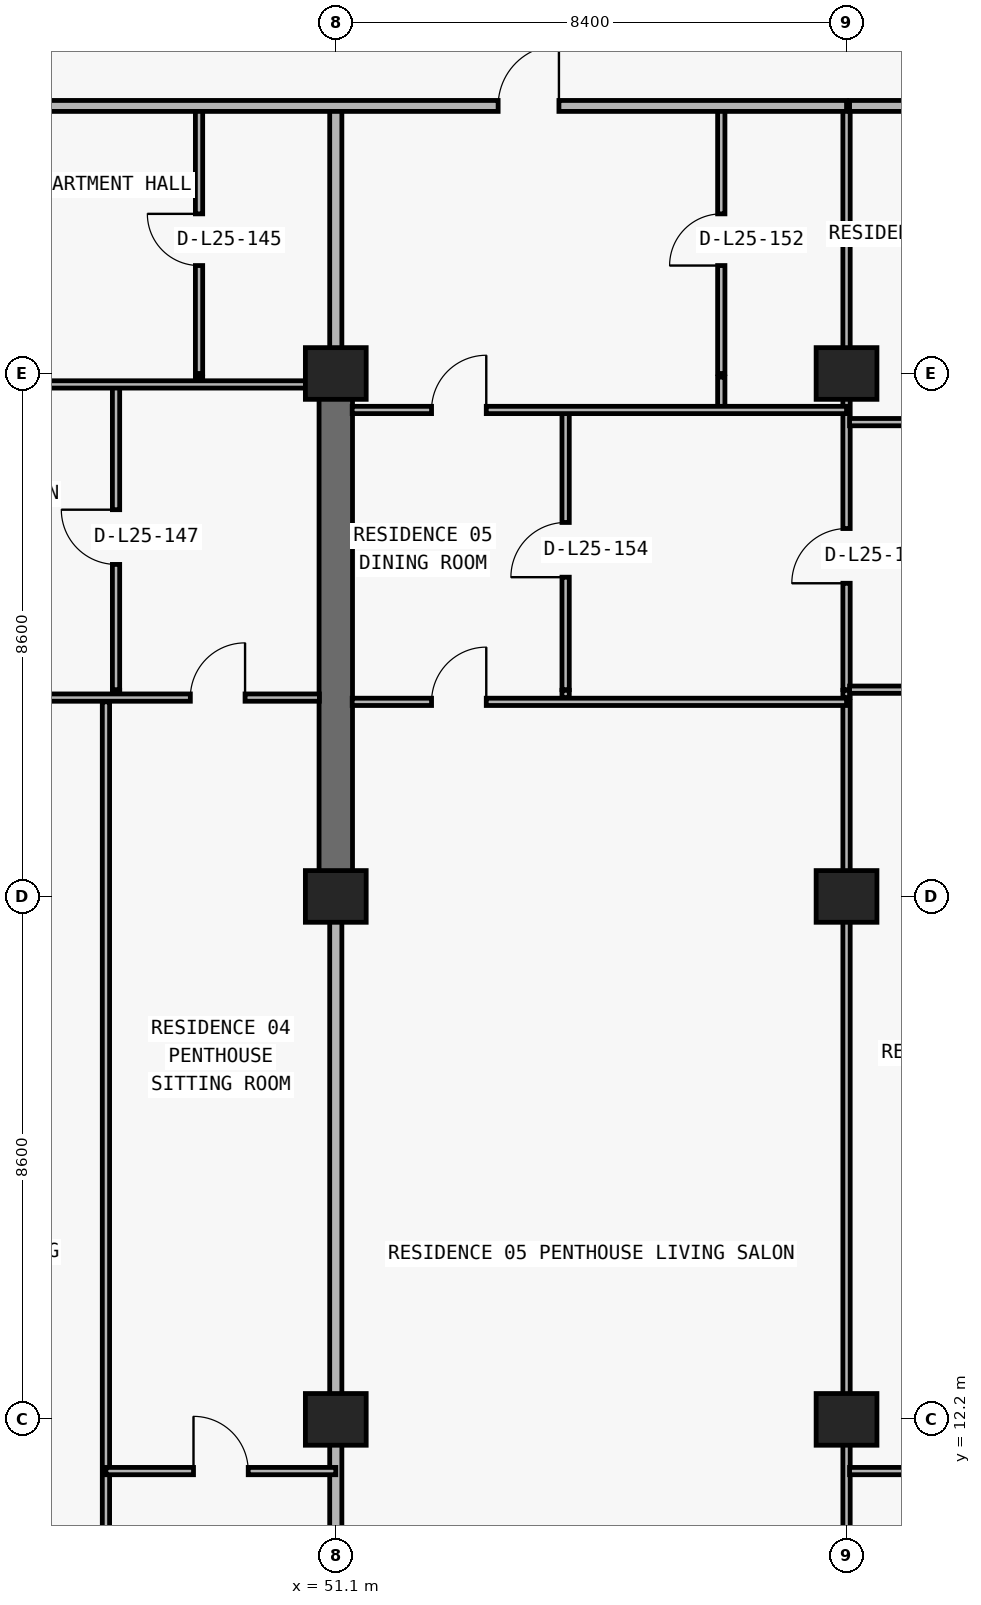
"""IFC4 building model, lengths in metres.
Left out: names, types, materials, properties, quantities, classifications, styles, units other than length and angle.
Written with IfcOpenShell. Run it as: python <this file> out.ifc"""

import sys

from ifc_helpers import new_model, si_unit, direction, frame, frame_2d, origin, origin_2d, place, context, subcontext, project, spatial, rectangle, extrude, element, fill, save


model = new_model("IFC4")
c1 = context("Model", 3, precision=1e-05, world=origin(), true_north=direction((0.0, 1.0)))
c2 = subcontext(c1, "Body", "Model", "MODEL_VIEW")
j1 = project(units=[si_unit("LENGTHUNIT", "METRE"), si_unit("PLANEANGLEUNIT", "RADIAN")], contexts=[c1])
p1 = place(None, origin())
s1 = spatial("IfcSite", under=j1, at=p1, CompositionType="ELEMENT")
p2 = place(p1, origin())
s2 = spatial("IfcBuilding", under=s1, at=p2, CompositionType="ELEMENT")
p3 = place(p2, frame((0.0, 0.0, 94.5)))
s3 = spatial("IfcBuildingStorey", under=s2, at=p3, CompositionType="ELEMENT", Elevation=94.5)
for number, where, z_axis, x_axis in (
    (1, (51.1, 12.2, 0.0), (0.0, 0.0, 1.0), (1.0, 0.0, 0.0)),
    (2, (59.5, 12.2, 0.0), (0.0, 0.0, 1.0), (1.0, 0.0, 0.0)),
    (3, (51.1, 20.8, 0.0), (0.0, 0.0, 1.0), (1.0, 0.0, 0.0)),
    (4, (59.5, 20.8, 0.0), (0.0, 0.0, 1.0), (1.0, 0.0, 0.0)),
    (5, (51.1, 29.4, 0.0), (0.0, 0.0, 1.0), (1.0, 0.0, 0.0)),
    (6, (59.5, 29.4, 0.0), (0.0, 0.0, 1.0), (1.0, 0.0, 0.0)),
):
    element("IfcColumn", number, at=place(p3, frame(where, z_axis=z_axis, x_axis=x_axis)), inside=s3, PredefinedType="COLUMN", context=c2, shape_type="SweptSolid", body=[
        extrude(rectangle(XDim=1.0, YDim=0.85, at=origin_2d()), origin(), (0.0, 0.0, 1.0), 3.0),
    ])
p4 = place(p3, frame((51.1, 20.8, 0.0), z_axis=(0.0, 0.0, 1.0), x_axis=(0.0, 1.0, 0.0)))
e7 = element("IfcWall", 7, at=p4, inside=s3, PredefinedType="SHEAR", context=c2, shape_type="SweptSolid", body=[
    extrude(rectangle(XDim=8.6, YDim=0.55, at=frame_2d((4.3, 0.0))), origin(), (0.0, 0.0, 1.0), 3.0),
])
p5 = place(p3, frame((47.32, 8.84, 0.0), z_axis=(0.0, 0.0, 1.0), x_axis=(0.0, 1.0, 0.0)))
e8 = element("IfcWall", 8, at=p5, inside=s3, PredefinedType="PARTITIONING", context=c2, shape_type="SweptSolid", body=[
    extrude(rectangle(XDim=15.16, YDim=0.12, at=frame_2d((7.58, 0.0))), origin(), (0.0, 0.0, 1.0), 3.0),
])
p6 = place(p3, frame((47.486, 24.07, 0.0), z_axis=(0.0, 0.0, 1.0), x_axis=(0.0, 1.0, 0.0)))
e9 = element("IfcWall", 9, at=p6, inside=s3, PredefinedType="PARTITIONING", context=c2, shape_type="SweptSolid", body=[
    extrude(rectangle(XDim=0.12, YDim=0.12, at=frame_2d((0.06, 0.0))), origin(), (0.0, 0.0, 1.0), 3.0),
])
p7 = place(p3, frame((47.486, 24.2, 0.0), z_axis=(0.0, 0.0, 1.0), x_axis=(0.0, 1.0, 0.0)))
e10 = element("IfcWall", 10, at=p7, inside=s3, PredefinedType="PARTITIONING", context=c2, shape_type="SweptSolid", body=[
    extrude(rectangle(XDim=5.02, YDim=0.12, at=frame_2d((2.51, 0.0))), origin(), (0.0, 0.0, 1.0), 3.0),
])
p8 = place(p7, frame((2.06, 0.0, 0.0)))
e11 = element("IfcOpeningElement", 11, at=p8, cuts=e10, PredefinedType="OPENING", context=c2, shape_type="SweptSolid", body=[
    extrude(rectangle(XDim=0.9, YDim=2.15, at=frame_2d((0.45, 1.075))), frame((0.0, 0.07, 0.0), z_axis=(0.0, -1.0, 0.0), x_axis=(1.0, 0.0, 0.0)), (0.0, 0.0, 1.0), 0.14),
])
p9 = place(p3, frame((48.851, 29.22, 0.0), z_axis=(0.0, 0.0, 1.0), x_axis=(0.0, 1.0, 0.0)))
e12 = element("IfcWall", 12, at=p9, inside=s3, PredefinedType="PARTITIONING", context=c2, shape_type="SweptSolid", body=[
    extrude(rectangle(XDim=0.12, YDim=0.12, at=frame_2d((0.06, 0.0))), origin(), (0.0, 0.0, 1.0), 3.0),
])
p10 = place(p3, frame((48.851, 29.4, 0.0), z_axis=(0.0, 0.0, 1.0), x_axis=(0.0, 1.0, 0.0)))
e13 = element("IfcWall", 13, at=p10, inside=s3, PredefinedType="PARTITIONING", context=c2, shape_type="SweptSolid", body=[
    extrude(rectangle(XDim=4.4, YDim=0.12, at=frame_2d((2.2, 0.0))), origin(), (0.0, 0.0, 1.0), 3.0),
])
p11 = place(p10, frame((1.775, 0.0, 0.0)))
e14 = element("IfcOpeningElement", 14, at=p11, cuts=e13, PredefinedType="OPENING", context=c2, shape_type="SweptSolid", body=[
    extrude(rectangle(XDim=0.85, YDim=2.1, at=frame_2d((0.425, 1.05))), frame((0.0, 0.07, 0.0), z_axis=(0.0, -1.0, 0.0), x_axis=(1.0, 0.0, 0.0)), (0.0, 0.0, 1.0), 0.14),
])
p12 = place(p3, frame((51.1, 8.84, 0.0), z_axis=(0.0, 0.0, 1.0), x_axis=(0.0, 1.0, 0.0)))
e15 = element("IfcWall", 15, at=p12, inside=s3, PredefinedType="PARTITIONING", context=c2, shape_type="SweptSolid", body=[
    extrude(rectangle(XDim=11.955, YDim=0.2, at=frame_2d((5.978, 0.0))), origin(), (0.0, 0.0, 1.0), 2.124),
])
p13 = place(p3, frame((51.1, 29.405, 0.0), z_axis=(0.0, 0.0, 1.0), x_axis=(0.0, 1.0, 0.0)))
e16 = element("IfcWall", 16, at=p13, inside=s3, PredefinedType="PARTITIONING", context=c2, shape_type="SweptSolid", body=[
    extrude(rectangle(XDim=4.395, YDim=0.2, at=frame_2d((2.198, 0.0))), origin(), (0.0, 0.0, 1.0), 2.285),
])
p14 = place(p3, frame((54.88, 24.07, 0.0), z_axis=(0.0, 0.0, 1.0), x_axis=(0.0, 1.0, 0.0)))
e17 = element("IfcWall", 17, at=p14, inside=s3, PredefinedType="PARTITIONING", context=c2, shape_type="SweptSolid", body=[
    extrude(rectangle(XDim=0.12, YDim=0.12, at=frame_2d((0.06, 0.0))), origin(), (0.0, 0.0, 1.0), 3.0),
])
p15 = place(p3, frame((54.88, 24.2, 0.0), z_axis=(0.0, 0.0, 1.0), x_axis=(0.0, 1.0, 0.0)))
e18 = element("IfcWall", 18, at=p15, inside=s3, PredefinedType="PARTITIONING", context=c2, shape_type="SweptSolid", body=[
    extrude(rectangle(XDim=4.6, YDim=0.12, at=frame_2d((2.3, 0.0))), origin(), (0.0, 0.0, 1.0), 3.0),
])
p16 = place(p15, frame((1.85, 0.0, 0.0)))
e19 = element("IfcOpeningElement", 19, at=p16, cuts=e18, PredefinedType="OPENING", context=c2, shape_type="SweptSolid", body=[
    extrude(rectangle(XDim=0.9, YDim=2.15, at=frame_2d((0.45, 1.075))), frame((0.0, 0.07, 0.0), z_axis=(0.0, -1.0, 0.0), x_axis=(1.0, 0.0, 0.0)), (0.0, 0.0, 1.0), 0.14),
])
p17 = place(p3, frame((57.44, 28.8, 0.0), z_axis=(0.0, 0.0, 1.0), x_axis=(0.0, 1.0, 0.0)))
e20 = element("IfcWall", 20, at=p17, inside=s3, PredefinedType="PARTITIONING", context=c2, shape_type="SweptSolid", body=[
    extrude(rectangle(XDim=0.54, YDim=0.12, at=frame_2d((0.27, 0.0))), origin(), (0.0, 0.0, 1.0), 2.629),
])
p18 = place(p3, frame((57.44, 29.4, 0.0), z_axis=(0.0, 0.0, 1.0), x_axis=(0.0, 1.0, 0.0)))
e21 = element("IfcWall", 21, at=p18, inside=s3, PredefinedType="PARTITIONING", context=c2, shape_type="SweptSolid", body=[
    extrude(rectangle(XDim=4.4, YDim=0.12, at=frame_2d((2.2, 0.0))), origin(), (0.0, 0.0, 1.0), 3.0),
])
p19 = place(p18, frame((1.775, 0.0, 0.0)))
e22 = element("IfcOpeningElement", 22, at=p19, cuts=e21, PredefinedType="OPENING", context=c2, shape_type="SweptSolid", body=[
    extrude(rectangle(XDim=0.85, YDim=2.1, at=frame_2d((0.425, 1.05))), frame((0.0, 0.07, 0.0), z_axis=(0.0, -1.0, 0.0), x_axis=(1.0, 0.0, 0.0)), (0.0, 0.0, 1.0), 0.14),
])
p20 = place(p3, frame((59.5, 8.84, 0.0), z_axis=(0.0, 0.0, 1.0), x_axis=(0.0, 1.0, 0.0)))
e23 = element("IfcWall", 23, at=p20, inside=s3, PredefinedType="PARTITIONING", context=c2, shape_type="SweptSolid", body=[
    extrude(rectangle(XDim=15.16, YDim=0.12, at=frame_2d((7.58, 0.0))), origin(), (0.0, 0.0, 1.0), 2.124),
])
p21 = place(p3, frame((59.5, 24.07, 0.0), z_axis=(0.0, 0.0, 1.0), x_axis=(0.0, 1.0, 0.0)))
e24 = element("IfcWall", 24, at=p21, inside=s3, PredefinedType="PARTITIONING", context=c2, shape_type="SweptSolid", body=[
    extrude(rectangle(XDim=0.12, YDim=0.12, at=frame_2d((0.06, 0.0))), origin(), (0.0, 0.0, 1.0), 2.124),
])
p22 = place(p3, frame((59.5, 24.2, 0.0), z_axis=(0.0, 0.0, 1.0), x_axis=(0.0, 1.0, 0.0)))
e25 = element("IfcWall", 25, at=p22, inside=s3, PredefinedType="PARTITIONING", context=c2, shape_type="SweptSolid", body=[
    extrude(rectangle(XDim=5.14, YDim=0.12, at=frame_2d((2.57, 0.0))), origin(), (0.0, 0.0, 1.0), 2.124),
])
p23 = place(p22, frame((1.75, 0.0, 0.0)))
e26 = element("IfcOpeningElement", 26, at=p23, cuts=e25, PredefinedType="OPENING", context=c2, shape_type="SweptSolid", body=[
    extrude(rectangle(XDim=0.9, YDim=2.074, at=frame_2d((0.45, 1.037))), frame((0.0, 0.07, 0.0), z_axis=(0.0, -1.0, 0.0), x_axis=(1.0, 0.0, 0.0)), (0.0, 0.0, 1.0), 0.14),
])
p24 = place(p3, frame((59.5, 29.4, 0.0), z_axis=(0.0, 0.0, 1.0), x_axis=(0.0, 1.0, 0.0)))
e27 = element("IfcWall", 27, at=p24, inside=s3, PredefinedType="PARTITIONING", context=c2, shape_type="SweptSolid", body=[
    extrude(rectangle(XDim=4.4, YDim=0.12, at=frame_2d((2.2, 0.0))), origin(), (0.0, 0.0, 1.0), 2.124),
])
p25 = place(p3, frame((47.32, 11.35, 0.0), z_axis=(0.0, 0.0, 1.0), x_axis=(1.0, 0.0, 0.0)))
e28 = element("IfcWall", 28, at=p25, inside=s3, PredefinedType="PARTITIONING", context=c2, shape_type="SweptSolid", body=[
    extrude(rectangle(XDim=3.78, YDim=0.12, at=frame_2d((1.89, 0.0))), origin(), (0.0, 0.0, 1.0), 3.0),
])
p26 = place(p25, frame((1.44, 0.0, 0.0)))
e29 = element("IfcOpeningElement", 29, at=p26, cuts=e28, PredefinedType="OPENING", context=c2, shape_type="SweptSolid", body=[
    extrude(rectangle(XDim=0.9, YDim=2.15, at=frame_2d((0.45, 1.075))), frame((0.0, 0.07, 0.0), z_axis=(0.0, -1.0, 0.0), x_axis=(1.0, 0.0, 0.0)), (0.0, 0.0, 1.0), 0.14),
])
p27 = place(p3, frame((59.55, 11.35, 0.0), z_axis=(0.0, 0.0, 1.0), x_axis=(1.0, 0.0, 0.0)))
e30 = element("IfcWall", 30, at=p27, inside=s3, PredefinedType="PARTITIONING", context=c2, shape_type="SweptSolid", body=[
    extrude(rectangle(XDim=8.35, YDim=0.12, at=frame_2d((4.175, 0.0))), origin(), (0.0, 0.0, 1.0), 3.0),
])
p28 = place(p27, frame((3.725, 0.0, 0.0)))
e31 = element("IfcOpeningElement", 31, at=p28, cuts=e30, PredefinedType="OPENING", context=c2, shape_type="SweptSolid", body=[
    extrude(rectangle(XDim=0.9, YDim=2.15, at=frame_2d((0.45, 1.075))), frame((0.0, 0.07, 0.0), z_axis=(0.0, -1.0, 0.0), x_axis=(1.0, 0.0, 0.0)), (0.0, 0.0, 1.0), 0.14),
])
p29 = place(p3, frame((51.37, 24.0, 0.0), z_axis=(0.0, 0.0, 1.0), x_axis=(1.0, 0.0, 0.0)))
e32 = element("IfcWall", 32, at=p29, inside=s3, PredefinedType="PARTITIONING", context=c2, shape_type="SweptSolid", body=[
    extrude(rectangle(XDim=8.13, YDim=0.12, at=frame_2d((4.065, 0.0))), origin(), (0.0, 0.0, 1.0), 3.0),
])
p30 = place(p29, frame((1.305, 0.0, 0.0)))
e33 = element("IfcOpeningElement", 33, at=p30, cuts=e32, PredefinedType="OPENING", context=c2, shape_type="SweptSolid", body=[
    extrude(rectangle(XDim=0.9, YDim=2.15, at=frame_2d((0.45, 1.075))), frame((0.0, 0.07, 0.0), z_axis=(0.0, -1.0, 0.0), x_axis=(1.0, 0.0, 0.0)), (0.0, 0.0, 1.0), 0.14),
])
p31 = place(p3, frame((42.7, 24.07, 0.0), z_axis=(0.0, 0.0, 1.0), x_axis=(1.0, 0.0, 0.0)))
e34 = element("IfcWall", 34, at=p31, inside=s3, PredefinedType="PARTITIONING", context=c2, shape_type="SweptSolid", body=[
    extrude(rectangle(XDim=8.13, YDim=0.12, at=frame_2d((4.065, 0.0))), origin(), (0.0, 0.0, 1.0), 3.0),
])
p32 = place(p31, frame((1.86, 0.0, 0.0)))
e35 = element("IfcOpeningElement", 35, at=p32, cuts=e34, PredefinedType="OPENING", context=c2, shape_type="SweptSolid", body=[
    extrude(rectangle(XDim=0.9, YDim=2.15, at=frame_2d((0.45, 1.075))), frame((0.0, 0.07, 0.0), z_axis=(0.0, -1.0, 0.0), x_axis=(1.0, 0.0, 0.0)), (0.0, 0.0, 1.0), 0.14),
])
p33 = place(p31, frame((6.008, 0.0, 0.0)))
e36 = element("IfcOpeningElement", 36, at=p33, cuts=e34, PredefinedType="OPENING", context=c2, shape_type="SweptSolid", body=[
    extrude(rectangle(XDim=0.9, YDim=2.15, at=frame_2d((0.45, 1.075))), frame((0.0, 0.07, 0.0), z_axis=(0.0, -1.0, 0.0), x_axis=(1.0, 0.0, 0.0)), (0.0, 0.0, 1.0), 0.14),
])
p34 = place(p3, frame((59.55, 24.2, 0.0), z_axis=(0.0, 0.0, 1.0), x_axis=(1.0, 0.0, 0.0)))
e37 = element("IfcWall", 37, at=p34, inside=s3, PredefinedType="PARTITIONING", context=c2, shape_type="SweptSolid", body=[
    extrude(rectangle(XDim=8.35, YDim=0.12, at=frame_2d((4.175, 0.0))), origin(), (0.0, 0.0, 1.0), 3.0),
])
p35 = place(p34, frame((3.725, 0.0, 0.0)))
e38 = element("IfcOpeningElement", 38, at=p35, cuts=e37, PredefinedType="OPENING", context=c2, shape_type="SweptSolid", body=[
    extrude(rectangle(XDim=0.9, YDim=2.15, at=frame_2d((0.45, 1.075))), frame((0.0, 0.07, 0.0), z_axis=(0.0, -1.0, 0.0), x_axis=(1.0, 0.0, 0.0)), (0.0, 0.0, 1.0), 0.14),
])
p36 = place(p3, frame((59.55, 28.6, 0.0), z_axis=(0.0, 0.0, 1.0), x_axis=(1.0, 0.0, 0.0)))
e39 = element("IfcWall", 39, at=p36, inside=s3, PredefinedType="PARTITIONING", context=c2, shape_type="SweptSolid", body=[
    extrude(rectangle(XDim=8.35, YDim=0.12, at=frame_2d((4.175, 0.0))), origin(), (0.0, 0.0, 1.0), 3.0),
])
p37 = place(p36, frame((2.802, 0.0, 0.0)))
e40 = element("IfcOpeningElement", 40, at=p37, cuts=e39, PredefinedType="OPENING", context=c2, shape_type="SweptSolid", body=[
    extrude(rectangle(XDim=0.9, YDim=2.15, at=frame_2d((0.45, 1.075))), frame((0.0, 0.07, 0.0), z_axis=(0.0, -1.0, 0.0), x_axis=(1.0, 0.0, 0.0)), (0.0, 0.0, 1.0), 0.14),
])
p38 = place(p3, frame((51.37, 28.8, 0.0), z_axis=(0.0, 0.0, 1.0), x_axis=(1.0, 0.0, 0.0)))
e41 = element("IfcWall", 41, at=p38, inside=s3, PredefinedType="PARTITIONING", context=c2, shape_type="SweptSolid", body=[
    extrude(rectangle(XDim=8.13, YDim=0.12, at=frame_2d((4.065, 0.0))), origin(), (0.0, 0.0, 1.0), 3.0),
])
p39 = place(p38, frame((1.305, 0.0, 0.0)))
e42 = element("IfcOpeningElement", 42, at=p39, cuts=e41, PredefinedType="OPENING", context=c2, shape_type="SweptSolid", body=[
    extrude(rectangle(XDim=0.9, YDim=2.15, at=frame_2d((0.45, 1.075))), frame((0.0, 0.07, 0.0), z_axis=(0.0, -1.0, 0.0), x_axis=(1.0, 0.0, 0.0)), (0.0, 0.0, 1.0), 0.14),
])
p40 = place(p3, frame((42.7, 29.22, 0.0), z_axis=(0.0, 0.0, 1.0), x_axis=(1.0, 0.0, 0.0)))
e43 = element("IfcWall", 43, at=p40, inside=s3, PredefinedType="PARTITIONING", context=c2, shape_type="SweptSolid", body=[
    extrude(rectangle(XDim=8.13, YDim=0.12, at=frame_2d((4.065, 0.0))), origin(), (0.0, 0.0, 1.0), 2.124),
])
p41 = place(p40, frame((1.943, 0.0, 0.0)))
e44 = element("IfcOpeningElement", 44, at=p41, cuts=e43, PredefinedType="OPENING", context=c2, shape_type="SweptSolid", body=[
    extrude(rectangle(XDim=0.9, YDim=2.074, at=frame_2d((0.45, 1.037))), frame((0.0, 0.07, 0.0), z_axis=(0.0, -1.0, 0.0), x_axis=(1.0, 0.0, 0.0)), (0.0, 0.0, 1.0), 0.14),
])
p42 = place(p3, frame((18.3, 33.8, 0.0), z_axis=(0.0, 0.0, 1.0), x_axis=(1.0, 0.0, 0.0)))
e45 = element("IfcWall", 45, at=p42, inside=s3, PredefinedType="PARTITIONING", context=c2, shape_type="SweptSolid", body=[
    extrude(rectangle(XDim=41.2, YDim=0.18, at=frame_2d((20.6, 0.0))), origin(), (0.0, 0.0, 1.0), 3.0),
])
p43 = place(p42, frame((10.946, 0.0, 0.0)))
e46 = element("IfcOpeningElement", 46, at=p43, cuts=e45, PredefinedType="OPENING", context=c2, shape_type="SweptSolid", body=[
    extrude(rectangle(XDim=1.0, YDim=2.2, at=frame_2d((0.5, 1.1))), frame((0.0, 0.1, 0.0), z_axis=(0.0, -1.0, 0.0), x_axis=(1.0, 0.0, 0.0)), (0.0, 0.0, 1.0), 0.2),
])
p44 = place(p42, frame((19.113, 0.0, 0.0)))
e47 = element("IfcOpeningElement", 47, at=p44, cuts=e45, PredefinedType="OPENING", context=c2, shape_type="SweptSolid", body=[
    extrude(rectangle(XDim=1.0, YDim=2.2, at=frame_2d((0.5, 1.1))), frame((0.0, 0.1, 0.0), z_axis=(0.0, -1.0, 0.0), x_axis=(1.0, 0.0, 0.0)), (0.0, 0.0, 1.0), 0.2),
])
p45 = place(p42, frame((26.976, 0.0, 0.0)))
e48 = element("IfcOpeningElement", 48, at=p45, cuts=e45, PredefinedType="OPENING", context=c2, shape_type="SweptSolid", body=[
    extrude(rectangle(XDim=1.0, YDim=2.2, at=frame_2d((0.5, 1.1))), frame((0.0, 0.1, 0.0), z_axis=(0.0, -1.0, 0.0), x_axis=(1.0, 0.0, 0.0)), (0.0, 0.0, 1.0), 0.2),
])
p46 = place(p42, frame((35.47, 0.0, 0.0)))
e49 = element("IfcOpeningElement", 49, at=p46, cuts=e45, PredefinedType="OPENING", context=c2, shape_type="SweptSolid", body=[
    extrude(rectangle(XDim=1.0, YDim=2.2, at=frame_2d((0.5, 1.1))), frame((0.0, 0.1, 0.0), z_axis=(0.0, -1.0, 0.0), x_axis=(1.0, 0.0, 0.0)), (0.0, 0.0, 1.0), 0.2),
])
p47 = place(p3, frame((59.55, 33.8, 0.0), z_axis=(0.0, 0.0, 1.0), x_axis=(1.0, 0.0, 0.0)))
e50 = element("IfcWall", 50, at=p47, inside=s3, PredefinedType="PARTITIONING", context=c2, shape_type="SweptSolid", body=[
    extrude(rectangle(XDim=10.55, YDim=0.18, at=frame_2d((5.275, 0.0))), origin(), (0.0, 0.0, 1.0), 3.0),
])
p48 = place(p11, origin())
e51 = element("IfcDoor", 51, at=p48, inside=s3, OperationType="SINGLE_SWING_RIGHT", PredefinedType="DOOR", context=c2, shape_type="SweptSolid", body=[
    extrude(rectangle(XDim=0.85, YDim=2.1, at=frame_2d((0.425, 1.05))), frame((0.0, 0.025, 0.0), z_axis=(0.0, -1.0, 0.0), x_axis=(1.0, 0.0, 0.0)), (0.0, 0.0, 1.0), 0.05),
])
fill(e14, e51)
p49 = place(p8, origin())
e52 = element("IfcDoor", 52, at=p49, inside=s3, OperationType="SINGLE_SWING_RIGHT", PredefinedType="DOOR", context=c2, shape_type="SweptSolid", body=[
    extrude(rectangle(XDim=0.9, YDim=2.15, at=frame_2d((0.45, 1.075))), frame((0.0, 0.025, 0.0), z_axis=(0.0, -1.0, 0.0), x_axis=(1.0, 0.0, 0.0)), (0.0, 0.0, 1.0), 0.05),
])
fill(e11, e52)
p50 = place(p33, origin())
e53 = element("IfcDoor", 53, at=p50, inside=s3, OperationType="SINGLE_SWING_RIGHT", PredefinedType="DOOR", context=c2, shape_type="SweptSolid", body=[
    extrude(rectangle(XDim=0.9, YDim=2.15, at=frame_2d((0.45, 1.075))), frame((0.0, 0.025, 0.0), z_axis=(0.0, -1.0, 0.0), x_axis=(1.0, 0.0, 0.0)), (0.0, 0.0, 1.0), 0.05),
])
fill(e36, e53)
p51 = place(p26, origin())
e54 = element("IfcDoor", 54, at=p51, inside=s3, OperationType="SINGLE_SWING_LEFT", PredefinedType="DOOR", context=c2, shape_type="SweptSolid", body=[
    extrude(rectangle(XDim=0.9, YDim=2.15, at=frame_2d((0.45, 1.075))), frame((0.0, 0.025, 0.0), z_axis=(0.0, -1.0, 0.0), x_axis=(1.0, 0.0, 0.0)), (0.0, 0.0, 1.0), 0.05),
])
fill(e29, e54)
p52 = place(p46, origin())
e55 = element("IfcDoor", 55, at=p52, inside=s3, OperationType="SINGLE_SWING_RIGHT", PredefinedType="DOOR", context=c2, shape_type="SweptSolid", body=[
    extrude(rectangle(XDim=1.0, YDim=2.2, at=frame_2d((0.5, 1.1))), frame((0.0, 0.025, 0.0), z_axis=(0.0, -1.0, 0.0), x_axis=(1.0, 0.0, 0.0)), (0.0, 0.0, 1.0), 0.05),
])
fill(e49, e55)
p53 = place(p19, origin())
e56 = element("IfcDoor", 56, at=p53, inside=s3, OperationType="SINGLE_SWING_LEFT", PredefinedType="DOOR", context=c2, shape_type="SweptSolid", body=[
    extrude(rectangle(XDim=0.85, YDim=2.1, at=frame_2d((0.425, 1.05))), frame((0.0, 0.025, 0.0), z_axis=(0.0, -1.0, 0.0), x_axis=(1.0, 0.0, 0.0)), (0.0, 0.0, 1.0), 0.05),
])
fill(e22, e56)
p54 = place(p39, origin())
e57 = element("IfcDoor", 57, at=p54, inside=s3, OperationType="SINGLE_SWING_RIGHT", PredefinedType="DOOR", context=c2, shape_type="SweptSolid", body=[
    extrude(rectangle(XDim=0.9, YDim=2.15, at=frame_2d((0.45, 1.075))), frame((0.0, 0.025, 0.0), z_axis=(0.0, -1.0, 0.0), x_axis=(1.0, 0.0, 0.0)), (0.0, 0.0, 1.0), 0.05),
])
fill(e42, e57)
p55 = place(p16, origin())
e58 = element("IfcDoor", 58, at=p55, inside=s3, OperationType="SINGLE_SWING_LEFT", PredefinedType="DOOR", context=c2, shape_type="SweptSolid", body=[
    extrude(rectangle(XDim=0.9, YDim=2.15, at=frame_2d((0.45, 1.075))), frame((0.0, 0.025, 0.0), z_axis=(0.0, -1.0, 0.0), x_axis=(1.0, 0.0, 0.0)), (0.0, 0.0, 1.0), 0.05),
])
fill(e19, e58)
p56 = place(p30, origin())
e59 = element("IfcDoor", 59, at=p56, inside=s3, OperationType="SINGLE_SWING_RIGHT", PredefinedType="DOOR", context=c2, shape_type="SweptSolid", body=[
    extrude(rectangle(XDim=0.9, YDim=2.15, at=frame_2d((0.45, 1.075))), frame((0.0, 0.025, 0.0), z_axis=(0.0, -1.0, 0.0), x_axis=(1.0, 0.0, 0.0)), (0.0, 0.0, 1.0), 0.05),
])
fill(e33, e59)
p57 = place(p23, origin())
e60 = element("IfcDoor", 60, at=p57, inside=s3, OperationType="SINGLE_SWING_LEFT", PredefinedType="DOOR", context=c2, shape_type="SweptSolid", body=[
    extrude(rectangle(XDim=0.9, YDim=2.074, at=frame_2d((0.45, 1.037))), frame((0.0, 0.025, 0.0), z_axis=(0.0, -1.0, 0.0), x_axis=(1.0, 0.0, 0.0)), (0.0, 0.0, 1.0), 0.05),
])
fill(e26, e60)
save(model, sys.argv[1])
